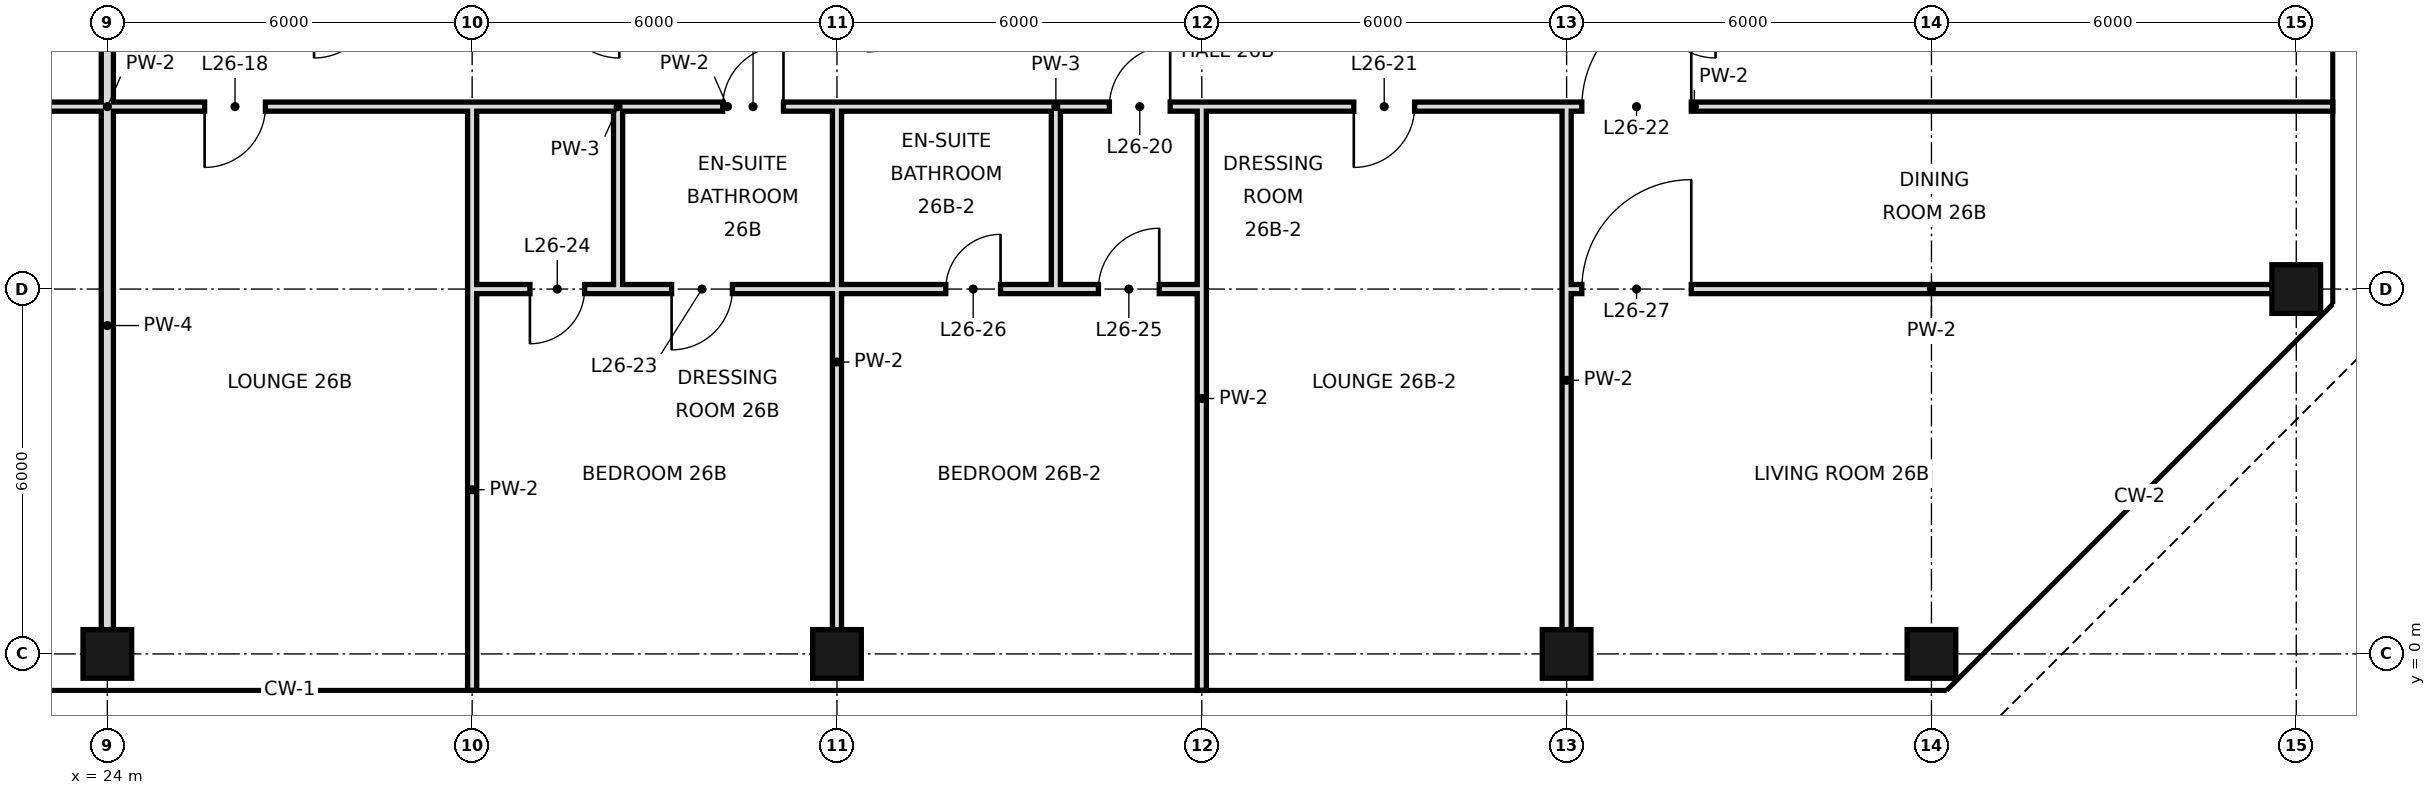
"""IFC4 building model, lengths in metres.
Left out: names, types, materials, properties, quantities, classifications, styles, units other than length and angle.
Written with IfcOpenShell. Run it as: python <this file> out.ifc"""

import sys

from ifc_helpers import new_model, si_unit, direction, frame, frame_2d, origin, origin_2d, place, context, subcontext, project, spatial, rectangle, hollow_rectangle, extrude, element, fill, save


model = new_model("IFC4")
c1 = context("Model", 3, precision=1e-05, world=origin(), true_north=direction((0.0, 1.0)))
c2 = subcontext(c1, "Body", "Model", "MODEL_VIEW")
j1 = project(units=[si_unit("LENGTHUNIT", "METRE"), si_unit("PLANEANGLEUNIT", "RADIAN")], contexts=[c1])
p1 = place(None, origin())
s1 = spatial("IfcSite", under=j1, at=p1, CompositionType="ELEMENT")
p2 = place(p1, origin())
s2 = spatial("IfcBuilding", under=s1, at=p2, CompositionType="ELEMENT")
p3 = place(p2, frame((0.0, 0.0, 119.6)))
s3 = spatial("IfcBuildingStorey", under=s2, at=p3, CompositionType="ELEMENT", Elevation=119.6)
for number, where, z_axis, x_axis in (
    (1, (24.0, 0.0, 0.0), (0.0, 0.0, 1.0), (1.0, 0.0, 0.0)),
    (2, (36.0, 0.0, 0.0), (0.0, 0.0, 1.0), (1.0, 0.0, 0.0)),
    (3, (48.0, 0.0, 0.0), (0.0, 0.0, 1.0), (1.0, 0.0, 0.0)),
    (4, (54.0, 0.0, 0.0), (0.0, 0.0, 1.0), (1.0, 0.0, 0.0)),
    (5, (60.0, 6.0, 0.0), (0.0, 0.0, 1.0), (1.0, 0.0, 0.0)),
):
    element("IfcColumn", number, at=place(p3, frame(where, z_axis=z_axis, x_axis=x_axis)), inside=s3, PredefinedType="COLUMN", context=c2, shape_type="SweptSolid", body=[
        extrude(hollow_rectangle(XDim=0.8, YDim=0.8, WallThickness=0.04, at=origin_2d()), origin(), (0.0, 0.0, 1.0), 3.6),
    ])
p4 = place(p3, frame((24.0, 0.0, 0.0), z_axis=(0.0, 0.0, 1.0), x_axis=(0.0, 1.0, 0.0)))
e6 = element("IfcWall", 6, at=p4, inside=s3, PredefinedType="SOLIDWALL", context=c2, shape_type="SweptSolid", body=[
    extrude(rectangle(XDim=10.8, YDim=0.2, at=frame_2d((5.4, 0.0))), origin(), (0.0, 0.0, 1.0), 2.72),
])
p5 = place(p3, frame((30.0, -0.6, 0.0), z_axis=(0.0, 0.0, 1.0), x_axis=(0.0, 1.0, 0.0)))
e7 = element("IfcWall", 7, at=p5, inside=s3, PredefinedType="PARTITIONING", context=c2, shape_type="SweptSolid", body=[
    extrude(rectangle(XDim=6.6, YDim=0.15, at=frame_2d((3.3, 0.0))), origin(), (0.0, 0.0, 1.0), 2.72),
])
p6 = place(p3, frame((30.0, 6.0, 0.0), z_axis=(0.0, 0.0, 1.0), x_axis=(0.0, 1.0, 0.0)))
e8 = element("IfcWall", 8, at=p6, inside=s3, PredefinedType="PARTITIONING", context=c2, shape_type="SweptSolid", body=[
    extrude(rectangle(XDim=3.0, YDim=0.15, at=frame_2d((1.5, 0.0))), origin(), (0.0, 0.0, 1.0), 2.72),
])
p7 = place(p3, frame((32.4, 6.0, 0.0), z_axis=(0.0, 0.0, 1.0), x_axis=(0.0, 1.0, 0.0)))
e9 = element("IfcWall", 9, at=p7, inside=s3, PredefinedType="PARTITIONING", context=c2, shape_type="SweptSolid", body=[
    extrude(rectangle(XDim=3.0, YDim=0.15, at=frame_2d((1.5, 0.0))), origin(), (0.0, 0.0, 1.0), 3.42),
])
p8 = place(p3, frame((36.0, 0.0, 0.0), z_axis=(0.0, 0.0, 1.0), x_axis=(0.0, 1.0, 0.0)))
e10 = element("IfcWall", 10, at=p8, inside=s3, PredefinedType="PARTITIONING", context=c2, shape_type="SweptSolid", body=[
    extrude(rectangle(XDim=6.0, YDim=0.15, at=frame_2d((3.0, 0.0))), origin(), (0.0, 0.0, 1.0), 2.72),
])
p9 = place(p3, frame((36.0, 6.0, 0.0), z_axis=(0.0, 0.0, 1.0), x_axis=(0.0, 1.0, 0.0)))
e11 = element("IfcWall", 11, at=p9, inside=s3, PredefinedType="PARTITIONING", context=c2, shape_type="SweptSolid", body=[
    extrude(rectangle(XDim=3.0, YDim=0.15, at=frame_2d((1.5, 0.0))), origin(), (0.0, 0.0, 1.0), 2.72),
])
p10 = place(p3, frame((39.6, 6.0, 0.0), z_axis=(0.0, 0.0, 1.0), x_axis=(0.0, 1.0, 0.0)))
e12 = element("IfcWall", 12, at=p10, inside=s3, PredefinedType="PARTITIONING", context=c2, shape_type="SweptSolid", body=[
    extrude(rectangle(XDim=3.0, YDim=0.15, at=frame_2d((1.5, 0.0))), origin(), (0.0, 0.0, 1.0), 3.42),
])
p11 = place(p3, frame((42.0, -0.6, 0.0), z_axis=(0.0, 0.0, 1.0), x_axis=(0.0, 1.0, 0.0)))
e13 = element("IfcWall", 13, at=p11, inside=s3, PredefinedType="PARTITIONING", context=c2, shape_type="SweptSolid", body=[
    extrude(rectangle(XDim=9.6, YDim=0.15, at=frame_2d((4.8, 0.0))), origin(), (0.0, 0.0, 1.0), 2.72),
])
p12 = place(p3, frame((48.0, 0.0, 0.0), z_axis=(0.0, 0.0, 1.0), x_axis=(0.0, 1.0, 0.0)))
e14 = element("IfcWall", 14, at=p12, inside=s3, PredefinedType="PARTITIONING", context=c2, shape_type="SweptSolid", body=[
    extrude(rectangle(XDim=9.0, YDim=0.15, at=frame_2d((4.5, 0.0))), origin(), (0.0, 0.0, 1.0), 2.72),
])
p13 = place(p3, frame((32.4, 6.0, 0.0), z_axis=(0.0, 0.0, 1.0), x_axis=(1.0, 0.0, 0.0)))
e15 = element("IfcWall", 15, at=p13, inside=s3, PredefinedType="PARTITIONING", context=c2, shape_type="SweptSolid", body=[
    extrude(rectangle(XDim=3.6, YDim=0.15, at=frame_2d((1.8, 0.0))), origin(), (0.0, 0.0, 1.0), 2.97),
])
p14 = place(p13, frame((0.88, 0.0, 0.0)))
e16 = element("IfcOpeningElement", 16, at=p14, cuts=e15, PredefinedType="OPENING", context=c2, shape_type="SweptSolid", body=[
    extrude(rectangle(XDim=1.0, YDim=2.4, at=frame_2d((0.5, 1.2))), frame((0.0, 0.085, 0.0), z_axis=(0.0, -1.0, 0.0), x_axis=(1.0, 0.0, 0.0)), (0.0, 0.0, 1.0), 0.17),
])
p15 = place(p3, frame((39.6, 6.0, 0.0), z_axis=(0.0, 0.0, 1.0), x_axis=(1.0, 0.0, 0.0)))
e17 = element("IfcWall", 17, at=p15, inside=s3, PredefinedType="PARTITIONING", context=c2, shape_type="SweptSolid", body=[
    extrude(rectangle(XDim=2.4, YDim=0.15, at=frame_2d((1.2, 0.0))), origin(), (0.0, 0.0, 1.0), 2.97),
])
p16 = place(p15, frame((0.7, 0.0, 0.0)))
e18 = element("IfcOpeningElement", 18, at=p16, cuts=e17, PredefinedType="OPENING", context=c2, shape_type="SweptSolid", body=[
    extrude(rectangle(XDim=1.0, YDim=2.4, at=frame_2d((0.5, 1.2))), frame((0.0, 0.085, 0.0), z_axis=(0.0, -1.0, 0.0), x_axis=(1.0, 0.0, 0.0)), (0.0, 0.0, 1.0), 0.17),
])
p17 = place(p3, frame((48.0, 6.0, 0.0), z_axis=(0.0, 0.0, 1.0), x_axis=(1.0, 0.0, 0.0)))
e19 = element("IfcWall", 19, at=p17, inside=s3, PredefinedType="PARTITIONING", context=c2, shape_type="SweptSolid", body=[
    extrude(rectangle(XDim=12.0, YDim=0.15, at=frame_2d((6.0, 0.0))), origin(), (0.0, 0.0, 1.0), 2.72),
])
p18 = place(p17, frame((0.25, 0.0, 0.0)))
e20 = element("IfcOpeningElement", 20, at=p18, cuts=e19, PredefinedType="OPENING", context=c2, shape_type="SweptSolid", body=[
    extrude(rectangle(XDim=1.8, YDim=2.4, at=frame_2d((0.9, 1.2))), frame((0.0, 0.085, 0.0), z_axis=(0.0, -1.0, 0.0), x_axis=(1.0, 0.0, 0.0)), (0.0, 0.0, 1.0), 0.17),
])
p19 = place(p3, frame((30.0, 6.0, 0.0), z_axis=(0.0, 0.0, 1.0), x_axis=(1.0, 0.0, 0.0)))
e21 = element("IfcWall", 21, at=p19, inside=s3, PredefinedType="PARTITIONING", context=c2, shape_type="SweptSolid", body=[
    extrude(rectangle(XDim=2.4, YDim=0.15, at=frame_2d((1.2, 0.0))), origin(), (0.0, 0.0, 1.0), 2.97),
])
p20 = place(p19, frame((0.95, 0.0, 0.0)))
e22 = element("IfcOpeningElement", 22, at=p20, cuts=e21, PredefinedType="OPENING", context=c2, shape_type="SweptSolid", body=[
    extrude(rectangle(XDim=0.9, YDim=2.4, at=frame_2d((0.45, 1.2))), frame((0.0, 0.085, 0.0), z_axis=(0.0, -1.0, 0.0), x_axis=(1.0, 0.0, 0.0)), (0.0, 0.0, 1.0), 0.17),
])
p21 = place(p3, frame((36.0, 6.0, 0.0), z_axis=(0.0, 0.0, 1.0), x_axis=(1.0, 0.0, 0.0)))
e23 = element("IfcWall", 23, at=p21, inside=s3, PredefinedType="PARTITIONING", context=c2, shape_type="SweptSolid", body=[
    extrude(rectangle(XDim=3.6, YDim=0.15, at=frame_2d((1.8, 0.0))), origin(), (0.0, 0.0, 1.0), 2.97),
])
p22 = place(p21, frame((1.79, 0.0, 0.0)))
e24 = element("IfcOpeningElement", 24, at=p22, cuts=e23, PredefinedType="OPENING", context=c2, shape_type="SweptSolid", body=[
    extrude(rectangle(XDim=0.9, YDim=2.4, at=frame_2d((0.45, 1.2))), frame((0.0, 0.085, 0.0), z_axis=(0.0, -1.0, 0.0), x_axis=(1.0, 0.0, 0.0)), (0.0, 0.0, 1.0), 0.17),
])
p23 = place(p3, frame((18.0, 9.0, 0.0), z_axis=(0.0, 0.0, 1.0), x_axis=(1.0, 0.0, 0.0)))
e25 = element("IfcWall", 25, at=p23, inside=s3, PredefinedType="PARTITIONING", context=c2, shape_type="SweptSolid", body=[
    extrude(rectangle(XDim=12.0, YDim=0.15, at=frame_2d((6.0, 0.0))), origin(), (0.0, 0.0, 1.0), 3.42),
])
p24 = place(p23, frame((2.1, 0.0, 0.0)))
e26 = element("IfcOpeningElement", 26, at=p24, cuts=e25, PredefinedType="OPENING", context=c2, shape_type="SweptSolid", body=[
    extrude(rectangle(XDim=1.8, YDim=2.4, at=frame_2d((0.9, 1.2))), frame((0.0, 0.085, 0.0), z_axis=(0.0, -1.0, 0.0), x_axis=(1.0, 0.0, 0.0)), (0.0, 0.0, 1.0), 0.17),
])
p25 = place(p23, frame((7.6, 0.0, 0.0)))
e27 = element("IfcOpeningElement", 27, at=p25, cuts=e25, PredefinedType="OPENING", context=c2, shape_type="SweptSolid", body=[
    extrude(rectangle(XDim=1.0, YDim=2.4, at=frame_2d((0.5, 1.2))), frame((0.0, 0.085, 0.0), z_axis=(0.0, -1.0, 0.0), x_axis=(1.0, 0.0, 0.0)), (0.0, 0.0, 1.0), 0.17),
])
p26 = place(p3, frame((32.4, 9.0, 0.0), z_axis=(0.0, 0.0, 1.0), x_axis=(1.0, 0.0, 0.0)))
e28 = element("IfcWall", 28, at=p26, inside=s3, PredefinedType="PARTITIONING", context=c2, shape_type="SweptSolid", body=[
    extrude(rectangle(XDim=3.6, YDim=0.15, at=frame_2d((1.8, 0.0))), origin(), (0.0, 0.0, 1.0), 3.42),
])
p27 = place(p26, frame((1.72, 0.0, 0.0)))
e29 = element("IfcOpeningElement", 29, at=p27, cuts=e28, PredefinedType="OPENING", context=c2, shape_type="SweptSolid", body=[
    extrude(rectangle(XDim=1.0, YDim=2.4, at=frame_2d((0.5, 1.2))), frame((0.0, 0.085, 0.0), z_axis=(0.0, -1.0, 0.0), x_axis=(1.0, 0.0, 0.0)), (0.0, 0.0, 1.0), 0.17),
])
p28 = place(p3, frame((39.6, 9.0, 0.0), z_axis=(0.0, 0.0, 1.0), x_axis=(1.0, 0.0, 0.0)))
e30 = element("IfcWall", 30, at=p28, inside=s3, PredefinedType="PARTITIONING", context=c2, shape_type="SweptSolid", body=[
    extrude(rectangle(XDim=21.0, YDim=0.15, at=frame_2d((10.5, 0.0))), origin(), (0.0, 0.0, 1.0), 3.42),
])
p29 = place(p28, frame((0.88, 0.0, 0.0)))
e31 = element("IfcOpeningElement", 31, at=p29, cuts=e30, PredefinedType="OPENING", context=c2, shape_type="SweptSolid", body=[
    extrude(rectangle(XDim=1.0, YDim=2.4, at=frame_2d((0.5, 1.2))), frame((0.0, 0.085, 0.0), z_axis=(0.0, -1.0, 0.0), x_axis=(1.0, 0.0, 0.0)), (0.0, 0.0, 1.0), 0.17),
])
p30 = place(p28, frame((4.9, 0.0, 0.0)))
e32 = element("IfcOpeningElement", 32, at=p30, cuts=e30, PredefinedType="OPENING", context=c2, shape_type="SweptSolid", body=[
    extrude(rectangle(XDim=1.0, YDim=2.4, at=frame_2d((0.5, 1.2))), frame((0.0, 0.085, 0.0), z_axis=(0.0, -1.0, 0.0), x_axis=(1.0, 0.0, 0.0)), (0.0, 0.0, 1.0), 0.17),
])
p31 = place(p28, frame((8.65, 0.0, 0.0)))
e33 = element("IfcOpeningElement", 33, at=p31, cuts=e30, PredefinedType="OPENING", context=c2, shape_type="SweptSolid", body=[
    extrude(rectangle(XDim=1.8, YDim=2.4, at=frame_2d((0.9, 1.2))), frame((0.0, 0.085, 0.0), z_axis=(0.0, -1.0, 0.0), x_axis=(1.0, 0.0, 0.0)), (0.0, 0.0, 1.0), 0.17),
])
p32 = place(p3, frame((30.0, 9.0, 0.0), z_axis=(0.0, 0.0, 1.0), x_axis=(1.0, 0.0, 0.0)))
e34 = element("IfcWall", 34, at=p32, inside=s3, PredefinedType="PARTITIONING", context=c2, shape_type="SweptSolid", body=[
    extrude(rectangle(XDim=2.4, YDim=0.15, at=frame_2d((1.2, 0.0))), origin(), (0.0, 0.0, 1.0), 3.42),
])
p33 = place(p3, frame((36.0, 9.0, 0.0), z_axis=(0.0, 0.0, 1.0), x_axis=(1.0, 0.0, 0.0)))
e35 = element("IfcWall", 35, at=p33, inside=s3, PredefinedType="PARTITIONING", context=c2, shape_type="SweptSolid", body=[
    extrude(rectangle(XDim=3.6, YDim=0.15, at=frame_2d((1.8, 0.0))), origin(), (0.0, 0.0, 1.0), 3.42),
])
p34 = place(p25, frame((1.0, 0.0, 0.0), z_axis=(0.0, 0.0, 1.0), x_axis=(-1.0, 0.0, 0.0)))
e36 = element("IfcDoor", 36, at=p34, inside=s3, OperationType="SINGLE_SWING_RIGHT", PredefinedType="DOOR", context=c2, shape_type="SweptSolid", body=[
    extrude(rectangle(XDim=1.0, YDim=2.4, at=frame_2d((0.5, 1.2))), frame((0.0, 0.025, 0.0), z_axis=(0.0, -1.0, 0.0), x_axis=(1.0, 0.0, 0.0)), (0.0, 0.0, 1.0), 0.05),
])
fill(e27, e36)
p35 = place(p27, frame((1.0, 0.0, 0.0), z_axis=(0.0, 0.0, 1.0), x_axis=(-1.0, 0.0, 0.0)))
e37 = element("IfcDoor", 37, at=p35, inside=s3, OperationType="SINGLE_SWING_LEFT", PredefinedType="DOOR", context=c2, shape_type="SweptSolid", body=[
    extrude(rectangle(XDim=1.0, YDim=2.4, at=frame_2d((0.5, 1.2))), frame((0.0, 0.025, 0.0), z_axis=(0.0, -1.0, 0.0), x_axis=(1.0, 0.0, 0.0)), (0.0, 0.0, 1.0), 0.05),
])
fill(e29, e37)
p36 = place(p29, frame((1.0, 0.0, 0.0), z_axis=(0.0, 0.0, 1.0), x_axis=(-1.0, 0.0, 0.0)))
e38 = element("IfcDoor", 38, at=p36, inside=s3, OperationType="SINGLE_SWING_LEFT", PredefinedType="DOOR", context=c2, shape_type="SweptSolid", body=[
    extrude(rectangle(XDim=1.0, YDim=2.4, at=frame_2d((0.5, 1.2))), frame((0.0, 0.025, 0.0), z_axis=(0.0, -1.0, 0.0), x_axis=(1.0, 0.0, 0.0)), (0.0, 0.0, 1.0), 0.05),
])
fill(e31, e38)
p37 = place(p30, frame((1.0, 0.0, 0.0), z_axis=(0.0, 0.0, 1.0), x_axis=(-1.0, 0.0, 0.0)))
e39 = element("IfcDoor", 39, at=p37, inside=s3, OperationType="SINGLE_SWING_RIGHT", PredefinedType="DOOR", context=c2, shape_type="SweptSolid", body=[
    extrude(rectangle(XDim=1.0, YDim=2.4, at=frame_2d((0.5, 1.2))), frame((0.0, 0.025, 0.0), z_axis=(0.0, -1.0, 0.0), x_axis=(1.0, 0.0, 0.0)), (0.0, 0.0, 1.0), 0.05),
])
fill(e32, e39)
p38 = place(p31, frame((1.8, 0.0, 0.0), z_axis=(0.0, 0.0, 1.0), x_axis=(-1.0, 0.0, 0.0)))
e40 = element("IfcDoor", 40, at=p38, inside=s3, OperationType="SINGLE_SWING_LEFT", PredefinedType="DOOR", context=c2, shape_type="SweptSolid", body=[
    extrude(rectangle(XDim=1.8, YDim=2.4, at=frame_2d((0.9, 1.2))), frame((0.0, 0.025, 0.0), z_axis=(0.0, -1.0, 0.0), x_axis=(1.0, 0.0, 0.0)), (0.0, 0.0, 1.0), 0.05),
])
fill(e33, e40)
p39 = place(p14, frame((1.0, 0.0, 0.0), z_axis=(0.0, 0.0, 1.0), x_axis=(-1.0, 0.0, 0.0)))
e41 = element("IfcDoor", 41, at=p39, inside=s3, OperationType="SINGLE_SWING_RIGHT", PredefinedType="DOOR", context=c2, shape_type="SweptSolid", body=[
    extrude(rectangle(XDim=1.0, YDim=2.4, at=frame_2d((0.5, 1.2))), frame((0.0, 0.025, 0.0), z_axis=(0.0, -1.0, 0.0), x_axis=(1.0, 0.0, 0.0)), (0.0, 0.0, 1.0), 0.05),
])
fill(e16, e41)
p40 = place(p20, frame((0.9, 0.0, 0.0), z_axis=(0.0, 0.0, 1.0), x_axis=(-1.0, 0.0, 0.0)))
e42 = element("IfcDoor", 42, at=p40, inside=s3, OperationType="SINGLE_SWING_RIGHT", PredefinedType="DOOR", context=c2, shape_type="SweptSolid", body=[
    extrude(rectangle(XDim=0.9, YDim=2.4, at=frame_2d((0.45, 1.2))), frame((0.0, 0.025, 0.0), z_axis=(0.0, -1.0, 0.0), x_axis=(1.0, 0.0, 0.0)), (0.0, 0.0, 1.0), 0.05),
])
fill(e22, e42)
p41 = place(p16, frame((1.0, 0.0, 0.0), z_axis=(0.0, 0.0, 1.0), x_axis=(-1.0, 0.0, 0.0)))
e43 = element("IfcDoor", 43, at=p41, inside=s3, OperationType="SINGLE_SWING_LEFT", PredefinedType="DOOR", context=c2, shape_type="SweptSolid", body=[
    extrude(rectangle(XDim=1.0, YDim=2.4, at=frame_2d((0.5, 1.2))), frame((0.0, 0.025, 0.0), z_axis=(0.0, -1.0, 0.0), x_axis=(1.0, 0.0, 0.0)), (0.0, 0.0, 1.0), 0.05),
])
fill(e18, e43)
p42 = place(p22, frame((0.9, 0.0, 0.0), z_axis=(0.0, 0.0, 1.0), x_axis=(-1.0, 0.0, 0.0)))
e44 = element("IfcDoor", 44, at=p42, inside=s3, OperationType="SINGLE_SWING_LEFT", PredefinedType="DOOR", context=c2, shape_type="SweptSolid", body=[
    extrude(rectangle(XDim=0.9, YDim=2.4, at=frame_2d((0.45, 1.2))), frame((0.0, 0.025, 0.0), z_axis=(0.0, -1.0, 0.0), x_axis=(1.0, 0.0, 0.0)), (0.0, 0.0, 1.0), 0.05),
])
fill(e24, e44)
p43 = place(p18, frame((1.8, 0.0, 0.0), z_axis=(0.0, 0.0, 1.0), x_axis=(-1.0, 0.0, 0.0)))
e45 = element("IfcDoor", 45, at=p43, inside=s3, OperationType="SINGLE_SWING_LEFT", PredefinedType="DOOR", context=c2, shape_type="SweptSolid", body=[
    extrude(rectangle(XDim=1.8, YDim=2.4, at=frame_2d((0.9, 1.2))), frame((0.0, 0.025, 0.0), z_axis=(0.0, -1.0, 0.0), x_axis=(1.0, 0.0, 0.0)), (0.0, 0.0, 1.0), 0.05),
])
fill(e20, e45)
save(model, sys.argv[1])
